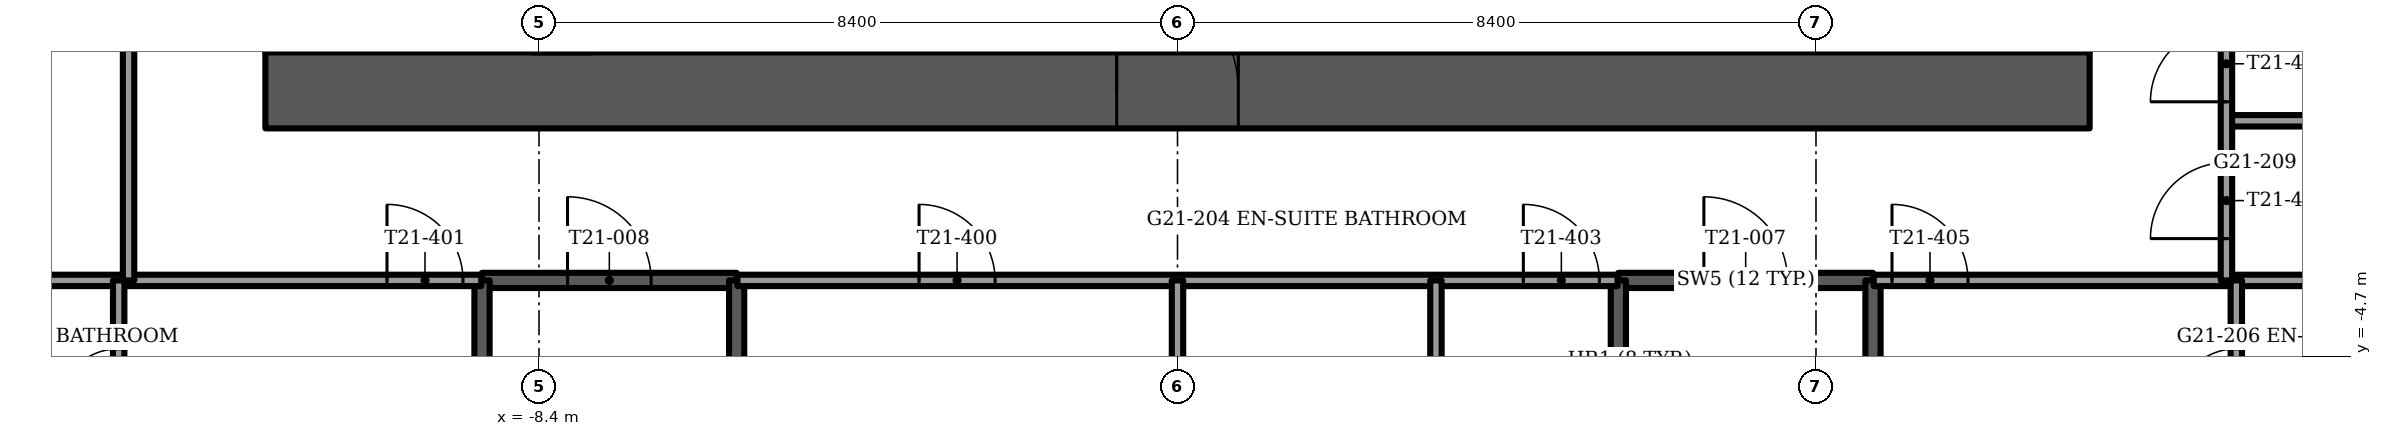
"""IFC4 building model, lengths in metres.
Left out: names, types, materials, properties, quantities, classifications, styles, units other than length and angle.
Written with IfcOpenShell. Run it as: python <this file> out.ifc"""

import sys

from ifc_helpers import new_model, si_unit, direction, frame, frame_2d, origin, place, context, subcontext, project, spatial, rectangle, extrude, element, fill, save


model = new_model("IFC4")
c1 = context("Model", 3, precision=1e-05, world=origin(), true_north=direction((0.0, 1.0)))
c2 = subcontext(c1, "Body", "Model", "MODEL_VIEW")
j1 = project(units=[si_unit("LENGTHUNIT", "METRE"), si_unit("PLANEANGLEUNIT", "RADIAN")], contexts=[c1])
p1 = place(None, origin())
s1 = spatial("IfcSite", under=j1, at=p1, CompositionType="ELEMENT")
p2 = place(p1, origin())
s2 = spatial("IfcBuilding", under=s1, at=p2, CompositionType="ELEMENT")
p3 = place(p2, frame((0.0, 0.0, 85.5)))
s3 = spatial("IfcBuildingStorey", under=s2, at=p3, CompositionType="ELEMENT", Elevation=85.5)
p4 = place(p3, frame((-12.0, -1.2, -0.3), z_axis=(0.0, 0.0, 1.0), x_axis=(1.0, 0.0, 0.0)))
e1 = element("IfcWall", 1, at=p4, inside=s3, PredefinedType="SHEAR", context=c2, shape_type="SweptSolid", body=[
    extrude(rectangle(XDim=24.0, YDim=1.0, at=frame_2d((12.0, 0.0))), origin(), (0.0, 0.0, 1.0), 3.75),
])
p5 = place(p4, frame((11.2, 0.0, 0.0)))
e2 = element("IfcOpeningElement", 2, at=p5, cuts=e1, PredefinedType="OPENING", context=c2, shape_type="SweptSolid", body=[
    extrude(rectangle(XDim=1.6, YDim=2.1, at=frame_2d((0.8, 1.05))), frame((0.0, 0.5, 0.0), z_axis=(0.0, -1.0, 0.0), x_axis=(1.0, 0.0, 0.0)), (0.0, 0.0, 1.0), 1.0),
])
p6 = place(p3, frame((-19.236, -0.532, 0.0), z_axis=(0.0, 0.0, 1.0), x_axis=(0.499995945303, -0.866027744752, 0.0)))
e3 = element("IfcWall", 3, at=p6, inside=s3, PredefinedType="SOLIDWALL", context=c2, shape_type="SweptSolid", body=[
    extrude(rectangle(XDim=18.314, YDim=0.15, at=frame_2d((9.157, 0.0))), origin(), (0.0, 0.0, 1.0), 3.45),
])
p7 = place(p6, frame((4.784, 0.0, 0.15)))
e4 = element("IfcOpeningElement", 4, at=p7, cuts=e3, PredefinedType="OPENING", context=c2, shape_type="SweptSolid", body=[
    extrude(rectangle(XDim=1.5, YDim=2.85, at=frame_2d((0.75, 1.425))), frame((0.0, 0.075, 0.0), z_axis=(0.0, -1.0, 0.0), x_axis=(1.0, 0.0, 0.0)), (0.0, 0.0, 1.0), 0.15),
])
p8 = place(p6, frame((7.357, 0.0, 0.15)))
e5 = element("IfcOpeningElement", 5, at=p8, cuts=e3, PredefinedType="OPENING", context=c2, shape_type="SweptSolid", body=[
    extrude(rectangle(XDim=1.7, YDim=2.85, at=frame_2d((0.85, 1.425))), frame((0.0, 0.075, 0.0), z_axis=(0.0, -1.0, 0.0), x_axis=(1.0, 0.0, 0.0)), (0.0, 0.0, 1.0), 0.15),
])
p9 = place(p6, frame((9.457, 0.0, 0.0)))
e6 = element("IfcOpeningElement", 6, at=p9, cuts=e3, PredefinedType="OPENING", context=c2, shape_type="SweptSolid", body=[
    extrude(rectangle(XDim=1.5, YDim=2.4, at=frame_2d((0.75, 1.2))), frame((0.0, 0.075, 0.0), z_axis=(0.0, -1.0, 0.0), x_axis=(1.0, 0.0, 0.0)), (0.0, 0.0, 1.0), 0.15),
])
p10 = place(p6, frame((11.557, 0.0, 0.15)))
e7 = element("IfcOpeningElement", 7, at=p10, cuts=e3, PredefinedType="OPENING", context=c2, shape_type="SweptSolid", body=[
    extrude(rectangle(XDim=1.7, YDim=2.85, at=frame_2d((0.85, 1.425))), frame((0.0, 0.075, 0.0), z_axis=(0.0, -1.0, 0.0), x_axis=(1.0, 0.0, 0.0)), (0.0, 0.0, 1.0), 0.15),
])
p11 = place(p6, frame((13.657, 0.0, 0.0)))
e8 = element("IfcOpeningElement", 8, at=p11, cuts=e3, PredefinedType="OPENING", context=c2, shape_type="SweptSolid", body=[
    extrude(rectangle(XDim=1.5, YDim=2.4, at=frame_2d((0.75, 1.2))), frame((0.0, 0.075, 0.0), z_axis=(0.0, -1.0, 0.0), x_axis=(1.0, 0.0, 0.0)), (0.0, 0.0, 1.0), 0.15),
])
p12 = place(p6, frame((0.528, 0.0, 0.15)))
e9 = element("IfcOpeningElement", 9, at=p12, cuts=e3, PredefinedType="OPENING", context=c2, shape_type="SweptSolid", body=[
    extrude(rectangle(XDim=1.7, YDim=2.73, at=frame_2d((0.85, 1.365))), frame((0.0, 0.075, 0.0), z_axis=(0.0, -1.0, 0.0), x_axis=(1.0, 0.0, 0.0)), (0.0, 0.0, 1.0), 0.15),
])
p13 = place(p6, frame((16.085, 0.0, 0.15)))
e10 = element("IfcOpeningElement", 10, at=p13, cuts=e3, PredefinedType="OPENING", context=c2, shape_type="SweptSolid", body=[
    extrude(rectangle(XDim=1.7, YDim=2.73, at=frame_2d((0.85, 1.365))), frame((0.0, 0.075, 0.0), z_axis=(0.0, -1.0, 0.0), x_axis=(1.0, 0.0, 0.0)), (0.0, 0.0, 1.0), 0.15),
])
p14 = place(p3, frame((10.079, -16.393, 0.0), z_axis=(0.0, 0.0, 1.0), x_axis=(0.499995945303, 0.866027744752, 0.0)))
e11 = element("IfcWall", 11, at=p14, inside=s3, PredefinedType="SOLIDWALL", context=c2, shape_type="SweptSolid", body=[
    extrude(rectangle(XDim=18.314, YDim=0.15, at=frame_2d((9.157, 0.0))), origin(), (0.0, 0.0, 1.0), 3.45),
])
p15 = place(p14, frame((3.157, 0.0, 0.15)))
e12 = element("IfcOpeningElement", 12, at=p15, cuts=e11, PredefinedType="OPENING", context=c2, shape_type="SweptSolid", body=[
    extrude(rectangle(XDim=1.7, YDim=2.85, at=frame_2d((0.85, 1.425))), frame((0.0, 0.075, 0.0), z_axis=(0.0, -1.0, 0.0), x_axis=(1.0, 0.0, 0.0)), (0.0, 0.0, 1.0), 0.15),
])
p16 = place(p14, frame((5.257, 0.0, 0.0)))
e13 = element("IfcOpeningElement", 13, at=p16, cuts=e11, PredefinedType="OPENING", context=c2, shape_type="SweptSolid", body=[
    extrude(rectangle(XDim=1.5, YDim=2.4, at=frame_2d((0.75, 1.2))), frame((0.0, 0.075, 0.0), z_axis=(0.0, -1.0, 0.0), x_axis=(1.0, 0.0, 0.0)), (0.0, 0.0, 1.0), 0.15),
])
p17 = place(p14, frame((7.357, 0.0, 0.15)))
e14 = element("IfcOpeningElement", 14, at=p17, cuts=e11, PredefinedType="OPENING", context=c2, shape_type="SweptSolid", body=[
    extrude(rectangle(XDim=1.7, YDim=2.85, at=frame_2d((0.85, 1.425))), frame((0.0, 0.075, 0.0), z_axis=(0.0, -1.0, 0.0), x_axis=(1.0, 0.0, 0.0)), (0.0, 0.0, 1.0), 0.15),
])
p18 = place(p14, frame((9.28, 0.0, 0.0)))
e15 = element("IfcOpeningElement", 15, at=p18, cuts=e11, PredefinedType="OPENING", context=c2, shape_type="SweptSolid", body=[
    extrude(rectangle(XDim=1.5, YDim=2.4, at=frame_2d((0.75, 1.2))), frame((0.0, 0.075, 0.0), z_axis=(0.0, -1.0, 0.0), x_axis=(1.0, 0.0, 0.0)), (0.0, 0.0, 1.0), 0.15),
])
p19 = place(p14, frame((12.832, 0.0, 0.15)))
e16 = element("IfcOpeningElement", 16, at=p19, cuts=e11, PredefinedType="OPENING", context=c2, shape_type="SweptSolid", body=[
    extrude(rectangle(XDim=1.5, YDim=2.85, at=frame_2d((0.75, 1.425))), frame((0.0, 0.075, 0.0), z_axis=(0.0, -1.0, 0.0), x_axis=(1.0, 0.0, 0.0)), (0.0, 0.0, 1.0), 0.15),
])
p20 = place(p14, frame((0.528, 0.0, 0.15)))
e17 = element("IfcOpeningElement", 17, at=p20, cuts=e11, PredefinedType="OPENING", context=c2, shape_type="SweptSolid", body=[
    extrude(rectangle(XDim=1.7, YDim=2.73, at=frame_2d((0.85, 1.365))), frame((0.0, 0.075, 0.0), z_axis=(0.0, -1.0, 0.0), x_axis=(1.0, 0.0, 0.0)), (0.0, 0.0, 1.0), 0.15),
])
p21 = place(p14, frame((15.782, 0.0, 0.15)))
e18 = element("IfcOpeningElement", 18, at=p21, cuts=e11, PredefinedType="OPENING", context=c2, shape_type="SweptSolid", body=[
    extrude(rectangle(XDim=0.9, YDim=2.73, at=frame_2d((0.45, 1.365))), frame((0.0, 0.075, 0.0), z_axis=(0.0, -1.0, 0.0), x_axis=(1.0, 0.0, 0.0)), (0.0, 0.0, 1.0), 0.15),
])
p22 = place(p3, frame((5.8, -3.7, -0.3), z_axis=(0.0, 0.0, 1.0), x_axis=(1.0, 0.0, 0.0)))
e19 = element("IfcWall", 19, at=p22, inside=s3, PredefinedType="SOLIDWALL", context=c2, shape_type="SweptSolid", body=[
    extrude(rectangle(XDim=3.35, YDim=0.2, at=frame_2d((1.675, 0.0))), origin(), (0.0, 0.0, 1.0), 3.75),
])
p23 = place(p22, frame((1.125, 0.0, 0.0)))
e20 = element("IfcOpeningElement", 20, at=p23, cuts=e19, PredefinedType="OPENING", context=c2, shape_type="SweptSolid", body=[
    extrude(rectangle(XDim=1.1, YDim=2.1, at=frame_2d((0.55, 1.05))), frame((0.0, 0.1, 0.0), z_axis=(0.0, -1.0, 0.0), x_axis=(1.0, 0.0, 0.0)), (0.0, 0.0, 1.0), 0.2),
])
for number, where, z_axis, x_axis in (
    (21, (5.8, -3.7, -0.3), (0.0, 0.0, 1.0), (0.0, -1.0, 0.0)),
    (22, (9.15, -3.7, -0.3), (0.0, 0.0, 1.0), (0.0, -1.0, 0.0)),
):
    element("IfcWall", number, at=place(p3, frame(where, z_axis=z_axis, x_axis=x_axis)), inside=s3, PredefinedType="SOLIDWALL", context=c2, shape_type="SweptSolid", body=[
        extrude(rectangle(XDim=7.7, YDim=0.2, at=frame_2d((3.85, 0.0))), origin(), (0.0, 0.0, 1.0), 3.75),
    ])
p24 = place(p3, frame((-9.15, -3.7, -0.3), z_axis=(0.0, 0.0, 1.0), x_axis=(1.0, 0.0, 0.0)))
e23 = element("IfcWall", 23, at=p24, inside=s3, PredefinedType="SOLIDWALL", context=c2, shape_type="SweptSolid", body=[
    extrude(rectangle(XDim=3.35, YDim=0.2, at=frame_2d((1.675, 0.0))), origin(), (0.0, 0.0, 1.0), 3.75),
])
p25 = place(p24, frame((1.125, 0.0, 0.0)))
e24 = element("IfcOpeningElement", 24, at=p25, cuts=e23, PredefinedType="OPENING", context=c2, shape_type="SweptSolid", body=[
    extrude(rectangle(XDim=1.1, YDim=2.1, at=frame_2d((0.55, 1.05))), frame((0.0, 0.1, 0.0), z_axis=(0.0, -1.0, 0.0), x_axis=(1.0, 0.0, 0.0)), (0.0, 0.0, 1.0), 0.2),
])
for number, where, z_axis, x_axis in (
    (25, (-9.15, -3.7, -0.3), (0.0, 0.0, 1.0), (0.0, -1.0, 0.0)),
    (26, (-5.8, -3.7, -0.3), (0.0, 0.0, 1.0), (0.0, -1.0, 0.0)),
):
    element("IfcWall", number, at=place(p3, frame(where, z_axis=z_axis, x_axis=x_axis)), inside=s3, PredefinedType="SOLIDWALL", context=c2, shape_type="SweptSolid", body=[
        extrude(rectangle(XDim=7.7, YDim=0.2, at=frame_2d((3.85, 0.0))), origin(), (0.0, 0.0, 1.0), 3.75),
    ])
p26 = place(p3, frame((-17.459, -3.7, 0.0), z_axis=(0.0, 0.0, 1.0), x_axis=(1.0, 0.0, 0.0)))
e27 = element("IfcWall", 27, at=p26, inside=s3, PredefinedType="PARTITIONING", context=c2, shape_type="SweptSolid", body=[
    extrude(rectangle(XDim=8.299, YDim=0.15, at=frame_2d((4.149, 0.0))), origin(), (0.0, 0.0, 1.0), 3.45),
])
p27 = place(p26, frame((7.059, 0.0, 0.0)))
e28 = element("IfcOpeningElement", 28, at=p27, cuts=e27, PredefinedType="OPENING", context=c2, shape_type="SweptSolid", body=[
    extrude(rectangle(XDim=1.0, YDim=2.1, at=frame_2d((0.5, 1.05))), frame((0.0, 0.075, 0.0), z_axis=(0.0, -1.0, 0.0), x_axis=(1.0, 0.0, 0.0)), (0.0, 0.0, 1.0), 0.15),
])
p28 = place(p3, frame((-5.79, -3.7, 0.0), z_axis=(0.0, 0.0, 1.0), x_axis=(1.0, 0.0, 0.0)))
e29 = element("IfcWall", 29, at=p28, inside=s3, PredefinedType="PARTITIONING", context=c2, shape_type="SweptSolid", body=[
    extrude(rectangle(XDim=11.58, YDim=0.15, at=frame_2d((5.79, 0.0))), origin(), (0.0, 0.0, 1.0), 3.45),
])
p29 = place(p28, frame((2.39, 0.0, 0.0)))
e30 = element("IfcOpeningElement", 30, at=p29, cuts=e29, PredefinedType="OPENING", context=c2, shape_type="SweptSolid", body=[
    extrude(rectangle(XDim=1.0, YDim=2.1, at=frame_2d((0.5, 1.05))), frame((0.0, 0.075, 0.0), z_axis=(0.0, -1.0, 0.0), x_axis=(1.0, 0.0, 0.0)), (0.0, 0.0, 1.0), 0.15),
])
p30 = place(p28, frame((10.34, 0.0, 0.0)))
e31 = element("IfcOpeningElement", 31, at=p30, cuts=e29, PredefinedType="OPENING", context=c2, shape_type="SweptSolid", body=[
    extrude(rectangle(XDim=1.0, YDim=2.1, at=frame_2d((0.5, 1.05))), frame((0.0, 0.075, 0.0), z_axis=(0.0, -1.0, 0.0), x_axis=(1.0, 0.0, 0.0)), (0.0, 0.0, 1.0), 0.15),
])
p31 = place(p3, frame((9.16, -3.7, 0.0), z_axis=(0.0, 0.0, 1.0), x_axis=(1.0, 0.0, 0.0)))
e32 = element("IfcWall", 32, at=p31, inside=s3, PredefinedType="PARTITIONING", context=c2, shape_type="SweptSolid", body=[
    extrude(rectangle(XDim=8.299, YDim=0.15, at=frame_2d((4.149, 0.0))), origin(), (0.0, 0.0, 1.0), 3.45),
])
p32 = place(p31, frame((0.24, 0.0, 0.0)))
e33 = element("IfcOpeningElement", 33, at=p32, cuts=e32, PredefinedType="OPENING", context=c2, shape_type="SweptSolid", body=[
    extrude(rectangle(XDim=1.0, YDim=2.1, at=frame_2d((0.5, 1.05))), frame((0.0, 0.075, 0.0), z_axis=(0.0, -1.0, 0.0), x_axis=(1.0, 0.0, 0.0)), (0.0, 0.0, 1.0), 0.15),
])
p33 = place(p3, frame((13.8, -1.6, 0.0), z_axis=(0.0, 0.0, 1.0), x_axis=(1.0, 0.0, 0.0)))
e34 = element("IfcWall", 34, at=p33, inside=s3, PredefinedType="PARTITIONING", context=c2, shape_type="SweptSolid", body=[
    extrude(rectangle(XDim=4.872, YDim=0.15, at=frame_2d((2.436, 0.0))), origin(), (0.0, 0.0, 1.0), 3.45),
])
p34 = place(p3, frame((13.93, -6.3, 0.0), z_axis=(0.0, 0.0, 1.0), x_axis=(0.0, 1.0, 0.0)))
e35 = element("IfcWall", 35, at=p34, inside=s3, PredefinedType="PARTITIONING", context=c2, shape_type="SweptSolid", body=[
    extrude(rectangle(XDim=2.6, YDim=0.15, at=frame_2d((1.3, 0.0))), origin(), (0.0, 0.0, 1.0), 3.45),
])
p35 = place(p34, frame((0.9, 0.0, 0.0)))
e36 = element("IfcOpeningElement", 36, at=p35, cuts=e35, PredefinedType="OPENING", context=c2, shape_type="SweptSolid", body=[
    extrude(rectangle(XDim=0.8, YDim=2.1, at=frame_2d((0.4, 1.05))), frame((0.0, 0.075, 0.0), z_axis=(0.0, -1.0, 0.0), x_axis=(1.0, 0.0, 0.0)), (0.0, 0.0, 1.0), 0.15),
])
p36 = place(p3, frame((13.8, -3.7, 0.0), z_axis=(0.0, 0.0, 1.0), x_axis=(0.0, 1.0, 0.0)))
e37 = element("IfcWall", 37, at=p36, inside=s3, PredefinedType="PARTITIONING", context=c2, shape_type="SweptSolid", body=[
    extrude(rectangle(XDim=13.738, YDim=0.15, at=frame_2d((6.869, 0.0))), origin(), (0.0, 0.0, 1.0), 3.45),
])
p37 = place(p36, frame((0.55, 0.0, 0.0)))
e38 = element("IfcOpeningElement", 38, at=p37, cuts=e37, PredefinedType="OPENING", context=c2, shape_type="SweptSolid", body=[
    extrude(rectangle(XDim=1.0, YDim=2.1, at=frame_2d((0.5, 1.05))), frame((0.0, 0.075, 0.0), z_axis=(0.0, -1.0, 0.0), x_axis=(1.0, 0.0, 0.0)), (0.0, 0.0, 1.0), 0.15),
])
p38 = place(p36, frame((2.35, 0.0, 0.0)))
e39 = element("IfcOpeningElement", 39, at=p38, cuts=e37, PredefinedType="OPENING", context=c2, shape_type="SweptSolid", body=[
    extrude(rectangle(XDim=1.0, YDim=2.1, at=frame_2d((0.5, 1.05))), frame((0.0, 0.075, 0.0), z_axis=(0.0, -1.0, 0.0), x_axis=(1.0, 0.0, 0.0)), (0.0, 0.0, 1.0), 0.15),
])
p39 = place(p36, frame((9.4, 0.0, 0.0)))
e40 = element("IfcOpeningElement", 40, at=p39, cuts=e37, PredefinedType="OPENING", context=c2, shape_type="SweptSolid", body=[
    extrude(rectangle(XDim=1.0, YDim=2.1, at=frame_2d((0.5, 1.05))), frame((0.0, 0.075, 0.0), z_axis=(0.0, -1.0, 0.0), x_axis=(1.0, 0.0, 0.0)), (0.0, 0.0, 1.0), 0.15),
])
p40 = place(p3, frame((3.4, -7.3, 0.0), z_axis=(0.0, 0.0, 1.0), x_axis=(0.0, 1.0, 0.0)))
e41 = element("IfcWall", 41, at=p40, inside=s3, PredefinedType="PARTITIONING", context=c2, shape_type="SweptSolid", body=[
    extrude(rectangle(XDim=3.6, YDim=0.15, at=frame_2d((1.8, 0.0))), origin(), (0.0, 0.0, 1.0), 3.45),
])
p41 = place(p40, frame((1.4, 0.0, 0.0)))
e42 = element("IfcOpeningElement", 42, at=p41, cuts=e41, PredefinedType="OPENING", context=c2, shape_type="SweptSolid", body=[
    extrude(rectangle(XDim=0.8, YDim=2.1, at=frame_2d((0.4, 1.05))), frame((0.0, 0.075, 0.0), z_axis=(0.0, -1.0, 0.0), x_axis=(1.0, 0.0, 0.0)), (0.0, 0.0, 1.0), 0.15),
])
p42 = place(p3, frame((0.0, -16.97, 0.0), z_axis=(0.0, 0.0, 1.0), x_axis=(0.0, 1.0, 0.0)))
e43 = element("IfcWall", 43, at=p42, inside=s3, PredefinedType="PARTITIONING", context=c2, shape_type="SweptSolid", body=[
    extrude(rectangle(XDim=13.27, YDim=0.15, at=frame_2d((6.635, 0.0))), origin(), (0.0, 0.0, 1.0), 3.45),
])
p43 = place(p3, frame((-13.8, -3.7, 0.0), z_axis=(0.0, 0.0, 1.0), x_axis=(0.0, 1.0, 0.0)))
e44 = element("IfcWall", 44, at=p43, inside=s3, PredefinedType="PARTITIONING", context=c2, shape_type="SweptSolid", body=[
    extrude(rectangle(XDim=13.738, YDim=0.15, at=frame_2d((6.869, 0.0))), origin(), (0.0, 0.0, 1.0), 3.45),
])
p44 = place(p43, frame((4.412, 0.0, 0.0)))
e45 = element("IfcOpeningElement", 45, at=p44, cuts=e44, PredefinedType="OPENING", context=c2, shape_type="SweptSolid", body=[
    extrude(rectangle(XDim=1.0, YDim=2.1, at=frame_2d((0.5, 1.05))), frame((0.0, 0.075, 0.0), z_axis=(0.0, -1.0, 0.0), x_axis=(1.0, 0.0, 0.0)), (0.0, 0.0, 1.0), 0.15),
])
p45 = place(p43, frame((10.45, 0.0, 0.0)))
e46 = element("IfcOpeningElement", 46, at=p45, cuts=e44, PredefinedType="OPENING", context=c2, shape_type="SweptSolid", body=[
    extrude(rectangle(XDim=1.0, YDim=2.1, at=frame_2d((0.5, 1.05))), frame((0.0, 0.075, 0.0), z_axis=(0.0, -1.0, 0.0), x_axis=(1.0, 0.0, 0.0)), (0.0, 0.0, 1.0), 0.15),
])
p46 = place(p3, frame((-13.93, -6.3, 0.0), z_axis=(0.0, 0.0, 1.0), x_axis=(0.0, 1.0, 0.0)))
e47 = element("IfcWall", 47, at=p46, inside=s3, PredefinedType="PARTITIONING", context=c2, shape_type="SweptSolid", body=[
    extrude(rectangle(XDim=2.6, YDim=0.15, at=frame_2d((1.3, 0.0))), origin(), (0.0, 0.0, 1.0), 3.45),
])
p47 = place(p46, frame((0.9, 0.0, 0.0)))
e48 = element("IfcOpeningElement", 48, at=p47, cuts=e47, PredefinedType="OPENING", context=c2, shape_type="SweptSolid", body=[
    extrude(rectangle(XDim=0.8, YDim=2.1, at=frame_2d((0.4, 1.05))), frame((0.0, 0.075, 0.0), z_axis=(0.0, -1.0, 0.0), x_axis=(1.0, 0.0, 0.0)), (0.0, 0.0, 1.0), 0.15),
])
p48 = place(p5, origin())
e49 = element("IfcDoor", 49, at=p48, inside=s3, OperationType="DOUBLE_DOOR_SINGLE_SWING", PredefinedType="DOOR", context=c2, shape_type="SweptSolid", body=[
    extrude(rectangle(XDim=1.6, YDim=2.1, at=frame_2d((0.8, 1.05))), frame((0.0, 0.025, 0.0), z_axis=(0.0, -1.0, 0.0), x_axis=(1.0, 0.0, 0.0)), (0.0, 0.0, 1.0), 0.05),
])
fill(e2, e49)
p49 = place(p23, origin())
e50 = element("IfcDoor", 50, at=p49, inside=s3, OperationType="SINGLE_SWING_LEFT", PredefinedType="DOOR", context=c2, shape_type="SweptSolid", body=[
    extrude(rectangle(XDim=1.1, YDim=2.1, at=frame_2d((0.55, 1.05))), frame((0.0, 0.025, 0.0), z_axis=(0.0, -1.0, 0.0), x_axis=(1.0, 0.0, 0.0)), (0.0, 0.0, 1.0), 0.05),
])
fill(e20, e50)
p50 = place(p25, origin())
e51 = element("IfcDoor", 51, at=p50, inside=s3, OperationType="SINGLE_SWING_LEFT", PredefinedType="DOOR", context=c2, shape_type="SweptSolid", body=[
    extrude(rectangle(XDim=1.1, YDim=2.1, at=frame_2d((0.55, 1.05))), frame((0.0, 0.025, 0.0), z_axis=(0.0, -1.0, 0.0), x_axis=(1.0, 0.0, 0.0)), (0.0, 0.0, 1.0), 0.05),
])
fill(e24, e51)
p51 = place(p29, origin())
e52 = element("IfcDoor", 52, at=p51, inside=s3, OperationType="SINGLE_SWING_RIGHT", PredefinedType="DOOR", context=c2, shape_type="SweptSolid", body=[
    extrude(rectangle(XDim=1.0, YDim=2.1, at=frame_2d((0.5, 1.05))), frame((0.0, 0.025, 0.0), z_axis=(0.0, -1.0, 0.0), x_axis=(1.0, 0.0, 0.0)), (0.0, 0.0, 1.0), 0.05),
])
fill(e30, e52)
p52 = place(p27, origin())
e53 = element("IfcDoor", 53, at=p52, inside=s3, OperationType="SINGLE_SWING_RIGHT", PredefinedType="DOOR", context=c2, shape_type="SweptSolid", body=[
    extrude(rectangle(XDim=1.0, YDim=2.1, at=frame_2d((0.5, 1.05))), frame((0.0, 0.025, 0.0), z_axis=(0.0, -1.0, 0.0), x_axis=(1.0, 0.0, 0.0)), (0.0, 0.0, 1.0), 0.05),
])
fill(e28, e53)
p53 = place(p47, origin())
e54 = element("IfcDoor", 54, at=p53, inside=s3, OperationType="SINGLE_SWING_RIGHT", PredefinedType="DOOR", context=c2, shape_type="SweptSolid", body=[
    extrude(rectangle(XDim=0.8, YDim=2.1, at=frame_2d((0.4, 1.05))), frame((0.0, 0.025, 0.0), z_axis=(0.0, -1.0, 0.0), x_axis=(1.0, 0.0, 0.0)), (0.0, 0.0, 1.0), 0.05),
])
fill(e48, e54)
p54 = place(p30, origin())
e55 = element("IfcDoor", 55, at=p54, inside=s3, OperationType="SINGLE_SWING_RIGHT", PredefinedType="DOOR", context=c2, shape_type="SweptSolid", body=[
    extrude(rectangle(XDim=1.0, YDim=2.1, at=frame_2d((0.5, 1.05))), frame((0.0, 0.025, 0.0), z_axis=(0.0, -1.0, 0.0), x_axis=(1.0, 0.0, 0.0)), (0.0, 0.0, 1.0), 0.05),
])
fill(e31, e55)
p55 = place(p32, origin())
e56 = element("IfcDoor", 56, at=p55, inside=s3, OperationType="SINGLE_SWING_LEFT", PredefinedType="DOOR", context=c2, shape_type="SweptSolid", body=[
    extrude(rectangle(XDim=1.0, YDim=2.1, at=frame_2d((0.5, 1.05))), frame((0.0, 0.025, 0.0), z_axis=(0.0, -1.0, 0.0), x_axis=(1.0, 0.0, 0.0)), (0.0, 0.0, 1.0), 0.05),
])
fill(e33, e56)
p56 = place(p35, origin())
e57 = element("IfcDoor", 57, at=p56, inside=s3, OperationType="SINGLE_SWING_RIGHT", PredefinedType="DOOR", context=c2, shape_type="SweptSolid", body=[
    extrude(rectangle(XDim=0.8, YDim=2.1, at=frame_2d((0.4, 1.05))), frame((0.0, 0.025, 0.0), z_axis=(0.0, -1.0, 0.0), x_axis=(1.0, 0.0, 0.0)), (0.0, 0.0, 1.0), 0.05),
])
fill(e36, e57)
p57 = place(p37, origin())
e58 = element("IfcDoor", 58, at=p57, inside=s3, OperationType="SINGLE_SWING_LEFT", PredefinedType="DOOR", context=c2, shape_type="SweptSolid", body=[
    extrude(rectangle(XDim=1.0, YDim=2.1, at=frame_2d((0.5, 1.05))), frame((0.0, 0.025, 0.0), z_axis=(0.0, -1.0, 0.0), x_axis=(1.0, 0.0, 0.0)), (0.0, 0.0, 1.0), 0.05),
])
fill(e38, e58)
p58 = place(p38, origin())
e59 = element("IfcDoor", 59, at=p58, inside=s3, OperationType="SINGLE_SWING_LEFT", PredefinedType="DOOR", context=c2, shape_type="SweptSolid", body=[
    extrude(rectangle(XDim=1.0, YDim=2.1, at=frame_2d((0.5, 1.05))), frame((0.0, 0.025, 0.0), z_axis=(0.0, -1.0, 0.0), x_axis=(1.0, 0.0, 0.0)), (0.0, 0.0, 1.0), 0.05),
])
fill(e39, e59)
save(model, sys.argv[1])
